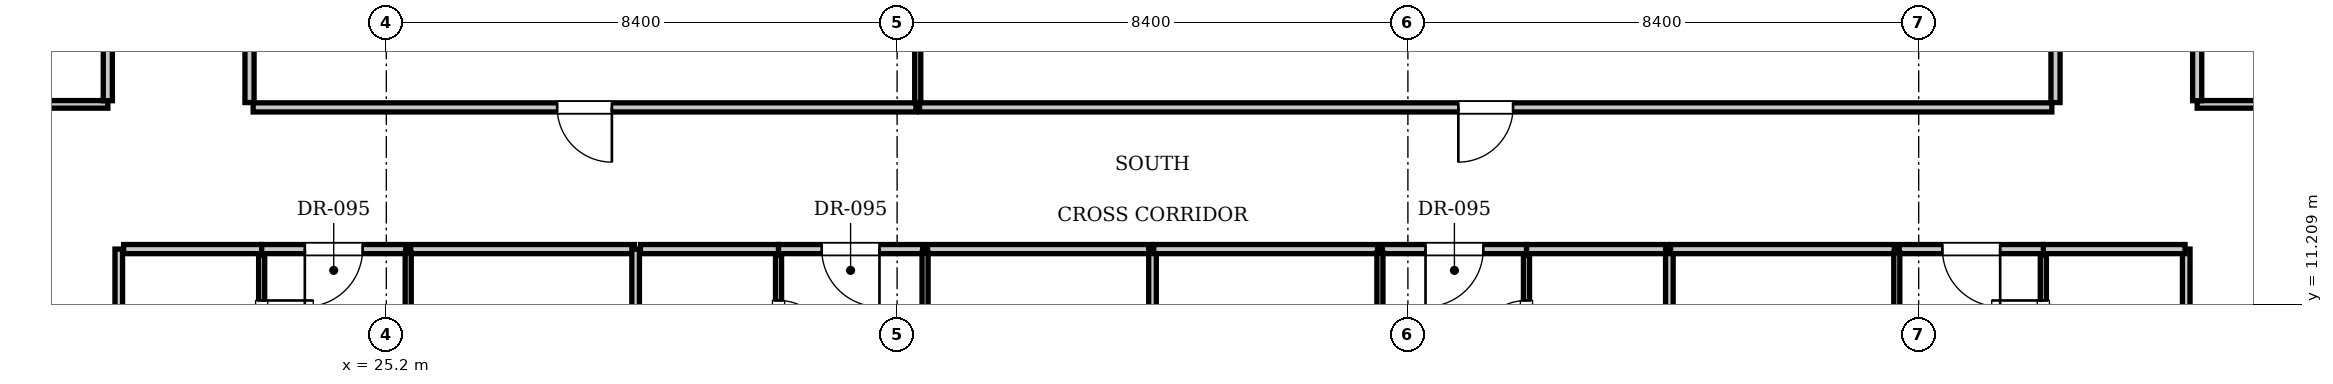
"""IFC4 building model, lengths in metres.
Left out: names, types, materials, properties, quantities, classifications, styles, units other than length and angle.
Written with IfcOpenShell. Run it as: python <this file> out.ifc"""

import sys

from ifc_helpers import new_model, si_unit, direction, frame, frame_2d, origin, place, context, subcontext, project, spatial, rectangle, extrude, element, fill, save


model = new_model("IFC4")
c1 = context("Model", 3, precision=1e-05, world=origin(), true_north=direction((0.0, 1.0)))
c2 = subcontext(c1, "Body", "Model", "MODEL_VIEW")
j1 = project(units=[si_unit("LENGTHUNIT", "METRE"), si_unit("PLANEANGLEUNIT", "RADIAN")], contexts=[c1])
p1 = place(None, origin())
s1 = spatial("IfcSite", under=j1, at=p1, CompositionType="ELEMENT")
p2 = place(p1, origin())
s2 = spatial("IfcBuilding", under=s1, at=p2, CompositionType="ELEMENT")
p3 = place(p2, frame((0.0, 0.0, 92.4)))
s3 = spatial("IfcBuildingStorey", under=s2, at=p3, CompositionType="ELEMENT", Elevation=92.4)
for number, where, z_axis, x_axis in (
    (1, (22.95, 14.53, 0.0), (0.0, 0.0, 1.0), (0.0, 1.0, 0.0)),
    (2, (52.65, 14.53, 0.0), (0.0, 0.0, 1.0), (0.0, 1.0, 0.0)),
):
    element("IfcWall", number, at=place(p3, frame(where, z_axis=z_axis, x_axis=x_axis)), inside=s3, PredefinedType="PARTITIONING", context=c2, shape_type="SweptSolid", body=[
        extrude(rectangle(XDim=8.43, YDim=0.15, at=frame_2d((4.215, 0.0))), origin(), (0.0, 0.0, 1.0), 3.61),
    ])
p4 = place(p3, frame((23.01, 14.45, 0.0), z_axis=(0.0, 0.0, 1.0), x_axis=(1.0, 0.0, 0.0)))
e3 = element("IfcWall", 3, at=p4, inside=s3, PredefinedType="PARTITIONING", context=c2, shape_type="SweptSolid", body=[
    extrude(rectangle(XDim=10.899, YDim=0.15, at=frame_2d((5.449, 0.0))), origin(), (0.0, 0.0, 1.0), 3.61),
])
p5 = place(p4, frame((5.0, 0.0, 0.0)))
e4 = element("IfcOpeningElement", 4, at=p5, cuts=e3, PredefinedType="OPENING", context=c2, shape_type="SweptSolid", body=[
    extrude(rectangle(XDim=0.9, YDim=2.1, at=frame_2d((0.45, 1.05))), frame((0.0, 0.085, 0.0), z_axis=(0.0, -1.0, 0.0), x_axis=(1.0, 0.0, 0.0)), (0.0, 0.0, 1.0), 0.17),
])
p6 = place(p3, frame((33.939, 14.53, 0.0), z_axis=(0.0, 0.0, 1.0), x_axis=(0.0, 1.0, 0.0)))
e5 = element("IfcWall", 5, at=p6, inside=s3, PredefinedType="PARTITIONING", context=c2, shape_type="SweptSolid", body=[
    extrude(rectangle(XDim=8.43, YDim=0.1, at=frame_2d((4.215, 0.0))), origin(), (0.0, 0.0, 1.0), 3.61),
])
p7 = place(p3, frame((33.969, 14.45, 0.0), z_axis=(0.0, 0.0, 1.0), x_axis=(1.0, 0.0, 0.0)))
e6 = element("IfcWall", 6, at=p7, inside=s3, PredefinedType="PARTITIONING", context=c2, shape_type="SweptSolid", body=[
    extrude(rectangle(XDim=18.621, YDim=0.15, at=frame_2d((9.311, 0.0))), origin(), (0.0, 0.0, 1.0), 3.61),
])
p8 = place(p7, frame((8.861, 0.0, 0.0)))
e7 = element("IfcOpeningElement", 7, at=p8, cuts=e6, PredefinedType="OPENING", context=c2, shape_type="SweptSolid", body=[
    extrude(rectangle(XDim=0.9, YDim=2.1, at=frame_2d((0.45, 1.05))), frame((0.0, 0.085, 0.0), z_axis=(0.0, -1.0, 0.0), x_axis=(1.0, 0.0, 0.0)), (0.0, 0.0, 1.0), 0.17),
])
for number, where, z_axis, x_axis in (
    (8, (20.8, 0.1, 0.0), (0.0, 0.0, 1.0), (0.0, 1.0, 0.0)),
    (9, (54.8, 0.1, 0.0), (0.0, 0.0, 1.0), (0.0, 1.0, 0.0)),
):
    element("IfcWall", number, at=place(p3, frame(where, z_axis=z_axis, x_axis=x_axis)), inside=s3, PredefinedType="PARTITIONING", context=c2, shape_type="SweptSolid", body=[
        extrude(rectangle(XDim=12.02, YDim=0.125, at=frame_2d((6.01, 0.0))), origin(), (0.0, 0.0, 1.0), 3.61),
    ])
p9 = place(p3, frame((20.88, 12.12, 0.0), z_axis=(0.0, 0.0, 1.0), x_axis=(1.0, 0.0, 0.0)))
e10 = element("IfcWall", 10, at=p9, inside=s3, PredefinedType="PARTITIONING", context=c2, shape_type="SweptSolid", body=[
    extrude(rectangle(XDim=2.27, YDim=0.15, at=frame_2d((1.135, 0.0))), origin(), (0.0, 0.0, 1.0), 3.61),
])
p10 = place(p3, frame((23.15, 9.68, 0.0), z_axis=(0.0, 0.0, 1.0), x_axis=(0.0, 1.0, 0.0)))
e11 = element("IfcWall", 11, at=p10, inside=s3, PredefinedType="PARTITIONING", context=c2, shape_type="SweptSolid", body=[
    extrude(rectangle(XDim=2.34, YDim=0.1, at=frame_2d((1.17, 0.0))), origin(), (0.0, 0.0, 1.0), 3.61),
])
p11 = place(p10, frame((0.745, 0.0, 0.0)))
e12 = element("IfcOpeningElement", 12, at=p11, cuts=e11, PredefinedType="OPENING", context=c2, shape_type="SweptSolid", body=[
    extrude(rectangle(XDim=0.85, YDim=2.1, at=frame_2d((0.425, 1.05))), frame((0.0, 0.06, 0.0), z_axis=(0.0, -1.0, 0.0), x_axis=(1.0, 0.0, 0.0)), (0.0, 0.0, 1.0), 0.12),
])
p12 = place(p3, frame((23.15, 12.12, 0.0), z_axis=(0.0, 0.0, 1.0), x_axis=(1.0, 0.0, 0.0)))
e13 = element("IfcWall", 13, at=p12, inside=s3, PredefinedType="PARTITIONING", context=c2, shape_type="SweptSolid", body=[
    extrude(rectangle(XDim=2.37, YDim=0.15, at=frame_2d((1.185, 0.0))), origin(), (0.0, 0.0, 1.0), 3.61),
])
p13 = place(p12, frame((0.71, 0.0, 0.0)))
e14 = element("IfcOpeningElement", 14, at=p13, cuts=e13, PredefinedType="OPENING", context=c2, shape_type="SweptSolid", body=[
    extrude(rectangle(XDim=0.95, YDim=2.15, at=frame_2d((0.475, 1.075))), frame((0.0, 0.085, 0.0), z_axis=(0.0, -1.0, 0.0), x_axis=(1.0, 0.0, 0.0)), (0.0, 0.0, 1.0), 0.17),
])
p14 = place(p3, frame((25.6, 12.12, 0.0), z_axis=(0.0, 0.0, 1.0), x_axis=(1.0, 0.0, 0.0)))
e15 = element("IfcWall", 15, at=p14, inside=s3, PredefinedType="PARTITIONING", context=c2, shape_type="SweptSolid", body=[
    extrude(rectangle(XDim=3.68, YDim=0.15, at=frame_2d((1.84, 0.0))), origin(), (0.0, 0.0, 1.0), 3.61),
])
p15 = place(p3, frame((25.56, 0.03, 0.0), z_axis=(0.0, 0.0, 1.0), x_axis=(0.0, 1.0, 0.0)))
e16 = element("IfcWall", 16, at=p15, inside=s3, PredefinedType="PARTITIONING", context=c2, shape_type="SweptSolid", body=[
    extrude(rectangle(XDim=12.03, YDim=0.1, at=frame_2d((6.015, 0.0))), origin(), (0.0, 0.0, 1.0), 3.61),
])
p16 = place(p15, frame((1.6, 0.0, 0.0)))
e17 = element("IfcOpeningElement", 17, at=p16, cuts=e16, PredefinedType="OPENING", context=c2, shape_type="SweptSolid", body=[
    extrude(rectangle(XDim=0.9, YDim=2.1, at=frame_2d((0.45, 1.05))), frame((0.0, 0.06, 0.0), z_axis=(0.0, -1.0, 0.0), x_axis=(1.0, 0.0, 0.0)), (0.0, 0.0, 1.0), 0.12),
])
p17 = place(p3, frame((29.3, 0.1, 0.0), z_axis=(0.0, 0.0, 1.0), x_axis=(0.0, 1.0, 0.0)))
e18 = element("IfcWall", 18, at=p17, inside=s3, PredefinedType="PARTITIONING", context=c2, shape_type="SweptSolid", body=[
    extrude(rectangle(XDim=12.02, YDim=0.125, at=frame_2d((6.01, 0.0))), origin(), (0.0, 0.0, 1.0), 3.293),
])
p18 = place(p3, frame((29.38, 12.12, 0.0), z_axis=(0.0, 0.0, 1.0), x_axis=(1.0, 0.0, 0.0)))
e19 = element("IfcWall", 19, at=p18, inside=s3, PredefinedType="PARTITIONING", context=c2, shape_type="SweptSolid", body=[
    extrude(rectangle(XDim=2.27, YDim=0.15, at=frame_2d((1.135, 0.0))), origin(), (0.0, 0.0, 1.0), 3.61),
])
p19 = place(p3, frame((31.65, 9.68, 0.0), z_axis=(0.0, 0.0, 1.0), x_axis=(0.0, 1.0, 0.0)))
e20 = element("IfcWall", 20, at=p19, inside=s3, PredefinedType="PARTITIONING", context=c2, shape_type="SweptSolid", body=[
    extrude(rectangle(XDim=2.34, YDim=0.1, at=frame_2d((1.17, 0.0))), origin(), (0.0, 0.0, 1.0), 3.61),
])
p20 = place(p19, frame((0.745, 0.0, 0.0)))
e21 = element("IfcOpeningElement", 21, at=p20, cuts=e20, PredefinedType="OPENING", context=c2, shape_type="SweptSolid", body=[
    extrude(rectangle(XDim=0.85, YDim=2.1, at=frame_2d((0.425, 1.05))), frame((0.0, 0.06, 0.0), z_axis=(0.0, -1.0, 0.0), x_axis=(1.0, 0.0, 0.0)), (0.0, 0.0, 1.0), 0.12),
])
p21 = place(p3, frame((31.65, 12.12, 0.0), z_axis=(0.0, 0.0, 1.0), x_axis=(1.0, 0.0, 0.0)))
e22 = element("IfcWall", 22, at=p21, inside=s3, PredefinedType="PARTITIONING", context=c2, shape_type="SweptSolid", body=[
    extrude(rectangle(XDim=2.37, YDim=0.15, at=frame_2d((1.185, 0.0))), origin(), (0.0, 0.0, 1.0), 3.61),
])
p22 = place(p21, frame((0.71, 0.0, 0.0)))
e23 = element("IfcOpeningElement", 23, at=p22, cuts=e22, PredefinedType="OPENING", context=c2, shape_type="SweptSolid", body=[
    extrude(rectangle(XDim=0.95, YDim=2.15, at=frame_2d((0.475, 1.075))), frame((0.0, 0.085, 0.0), z_axis=(0.0, -1.0, 0.0), x_axis=(1.0, 0.0, 0.0)), (0.0, 0.0, 1.0), 0.17),
])
p23 = place(p3, frame((34.1, 12.12, 0.0), z_axis=(0.0, 0.0, 1.0), x_axis=(1.0, 0.0, 0.0)))
e24 = element("IfcWall", 24, at=p23, inside=s3, PredefinedType="PARTITIONING", context=c2, shape_type="SweptSolid", body=[
    extrude(rectangle(XDim=3.68, YDim=0.15, at=frame_2d((1.84, 0.0))), origin(), (0.0, 0.0, 1.0), 3.61),
])
p24 = place(p3, frame((34.06, 0.03, 0.0), z_axis=(0.0, 0.0, 1.0), x_axis=(0.0, 1.0, 0.0)))
e25 = element("IfcWall", 25, at=p24, inside=s3, PredefinedType="PARTITIONING", context=c2, shape_type="SweptSolid", body=[
    extrude(rectangle(XDim=12.03, YDim=0.1, at=frame_2d((6.015, 0.0))), origin(), (0.0, 0.0, 1.0), 3.61),
])
p25 = place(p24, frame((1.6, 0.0, 0.0)))
e26 = element("IfcOpeningElement", 26, at=p25, cuts=e25, PredefinedType="OPENING", context=c2, shape_type="SweptSolid", body=[
    extrude(rectangle(XDim=0.9, YDim=2.1, at=frame_2d((0.45, 1.05))), frame((0.0, 0.06, 0.0), z_axis=(0.0, -1.0, 0.0), x_axis=(1.0, 0.0, 0.0)), (0.0, 0.0, 1.0), 0.12),
])
p26 = place(p3, frame((37.8, 0.1, 0.0), z_axis=(0.0, 0.0, 1.0), x_axis=(0.0, 1.0, 0.0)))
e27 = element("IfcWall", 27, at=p26, inside=s3, PredefinedType="PARTITIONING", context=c2, shape_type="SweptSolid", body=[
    extrude(rectangle(XDim=12.02, YDim=0.125, at=frame_2d((6.01, 0.0))), origin(), (0.0, 0.0, 1.0), 3.3),
])
p27 = place(p3, frame((43.95, 12.12, 0.0), z_axis=(0.0, 0.0, 1.0), x_axis=(1.0, 0.0, 0.0)))
e28 = element("IfcWall", 28, at=p27, inside=s3, PredefinedType="PARTITIONING", context=c2, shape_type="SweptSolid", body=[
    extrude(rectangle(XDim=2.33, YDim=0.15, at=frame_2d((1.165, 0.0))), origin(), (0.0, 0.0, 1.0), 3.61),
])
p28 = place(p3, frame((43.95, 9.68, 0.0), z_axis=(0.0, 0.0, 1.0), x_axis=(0.0, 1.0, 0.0)))
e29 = element("IfcWall", 29, at=p28, inside=s3, PredefinedType="PARTITIONING", context=c2, shape_type="SweptSolid", body=[
    extrude(rectangle(XDim=2.34, YDim=0.1, at=frame_2d((1.17, 0.0))), origin(), (0.0, 0.0, 1.0), 3.61),
])
p29 = place(p28, frame((0.745, 0.0, 0.0)))
e30 = element("IfcOpeningElement", 30, at=p29, cuts=e29, PredefinedType="OPENING", context=c2, shape_type="SweptSolid", body=[
    extrude(rectangle(XDim=0.85, YDim=2.1, at=frame_2d((0.425, 1.05))), frame((0.0, 0.06, 0.0), z_axis=(0.0, -1.0, 0.0), x_axis=(1.0, 0.0, 0.0)), (0.0, 0.0, 1.0), 0.12),
])
p30 = place(p3, frame((37.82, 12.12, 0.0), z_axis=(0.0, 0.0, 1.0), x_axis=(1.0, 0.0, 0.0)))
e31 = element("IfcWall", 31, at=p30, inside=s3, PredefinedType="PARTITIONING", context=c2, shape_type="SweptSolid", body=[
    extrude(rectangle(XDim=3.68, YDim=0.15, at=frame_2d((1.84, 0.0))), origin(), (0.0, 0.0, 1.0), 3.61),
])
p31 = place(p3, frame((41.58, 12.12, 0.0), z_axis=(0.0, 0.0, 1.0), x_axis=(1.0, 0.0, 0.0)))
e32 = element("IfcWall", 32, at=p31, inside=s3, PredefinedType="PARTITIONING", context=c2, shape_type="SweptSolid", body=[
    extrude(rectangle(XDim=2.37, YDim=0.15, at=frame_2d((1.185, 0.0))), origin(), (0.0, 0.0, 1.0), 3.61),
])
p32 = place(p31, frame((0.71, 0.0, 0.0)))
e33 = element("IfcOpeningElement", 33, at=p32, cuts=e32, PredefinedType="OPENING", context=c2, shape_type="SweptSolid", body=[
    extrude(rectangle(XDim=0.95, YDim=2.15, at=frame_2d((0.475, 1.075))), frame((0.0, 0.085, 0.0), z_axis=(0.0, -1.0, 0.0), x_axis=(1.0, 0.0, 0.0)), (0.0, 0.0, 1.0), 0.17),
])
p33 = place(p3, frame((41.54, 0.03, 0.0), z_axis=(0.0, 0.0, 1.0), x_axis=(0.0, 1.0, 0.0)))
e34 = element("IfcWall", 34, at=p33, inside=s3, PredefinedType="PARTITIONING", context=c2, shape_type="SweptSolid", body=[
    extrude(rectangle(XDim=12.03, YDim=0.1, at=frame_2d((6.015, 0.0))), origin(), (0.0, 0.0, 1.0), 3.61),
])
p34 = place(p33, frame((1.6, 0.0, 0.0)))
e35 = element("IfcOpeningElement", 35, at=p34, cuts=e34, PredefinedType="OPENING", context=c2, shape_type="SweptSolid", body=[
    extrude(rectangle(XDim=0.9, YDim=2.1, at=frame_2d((0.45, 1.05))), frame((0.0, 0.06, 0.0), z_axis=(0.0, -1.0, 0.0), x_axis=(1.0, 0.0, 0.0)), (0.0, 0.0, 1.0), 0.12),
])
p35 = place(p3, frame((46.3, 0.1, 0.0), z_axis=(0.0, 0.0, 1.0), x_axis=(0.0, 1.0, 0.0)))
e36 = element("IfcWall", 36, at=p35, inside=s3, PredefinedType="PARTITIONING", context=c2, shape_type="SweptSolid", body=[
    extrude(rectangle(XDim=12.02, YDim=0.125, at=frame_2d((6.01, 0.0))), origin(), (0.0, 0.0, 1.0), 3.352),
])
p36 = place(p3, frame((52.45, 12.12, 0.0), z_axis=(0.0, 0.0, 1.0), x_axis=(1.0, 0.0, 0.0)))
e37 = element("IfcWall", 37, at=p36, inside=s3, PredefinedType="PARTITIONING", context=c2, shape_type="SweptSolid", body=[
    extrude(rectangle(XDim=2.33, YDim=0.15, at=frame_2d((1.165, 0.0))), origin(), (0.0, 0.0, 1.0), 3.61),
])
p37 = place(p3, frame((52.45, 9.68, 0.0), z_axis=(0.0, 0.0, 1.0), x_axis=(0.0, 1.0, 0.0)))
e38 = element("IfcWall", 38, at=p37, inside=s3, PredefinedType="PARTITIONING", context=c2, shape_type="SweptSolid", body=[
    extrude(rectangle(XDim=2.34, YDim=0.1, at=frame_2d((1.17, 0.0))), origin(), (0.0, 0.0, 1.0), 3.61),
])
p38 = place(p37, frame((0.745, 0.0, 0.0)))
e39 = element("IfcOpeningElement", 39, at=p38, cuts=e38, PredefinedType="OPENING", context=c2, shape_type="SweptSolid", body=[
    extrude(rectangle(XDim=0.85, YDim=2.1, at=frame_2d((0.425, 1.05))), frame((0.0, 0.06, 0.0), z_axis=(0.0, -1.0, 0.0), x_axis=(1.0, 0.0, 0.0)), (0.0, 0.0, 1.0), 0.12),
])
p39 = place(p3, frame((46.32, 12.12, 0.0), z_axis=(0.0, 0.0, 1.0), x_axis=(1.0, 0.0, 0.0)))
e40 = element("IfcWall", 40, at=p39, inside=s3, PredefinedType="PARTITIONING", context=c2, shape_type="SweptSolid", body=[
    extrude(rectangle(XDim=3.68, YDim=0.15, at=frame_2d((1.84, 0.0))), origin(), (0.0, 0.0, 1.0), 3.61),
])
p40 = place(p3, frame((50.08, 12.12, 0.0), z_axis=(0.0, 0.0, 1.0), x_axis=(1.0, 0.0, 0.0)))
e41 = element("IfcWall", 41, at=p40, inside=s3, PredefinedType="PARTITIONING", context=c2, shape_type="SweptSolid", body=[
    extrude(rectangle(XDim=2.37, YDim=0.15, at=frame_2d((1.185, 0.0))), origin(), (0.0, 0.0, 1.0), 3.61),
])
p41 = place(p40, frame((0.71, 0.0, 0.0)))
e42 = element("IfcOpeningElement", 42, at=p41, cuts=e41, PredefinedType="OPENING", context=c2, shape_type="SweptSolid", body=[
    extrude(rectangle(XDim=0.95, YDim=2.15, at=frame_2d((0.475, 1.075))), frame((0.0, 0.085, 0.0), z_axis=(0.0, -1.0, 0.0), x_axis=(1.0, 0.0, 0.0)), (0.0, 0.0, 1.0), 0.17),
])
p42 = place(p3, frame((50.04, 0.03, 0.0), z_axis=(0.0, 0.0, 1.0), x_axis=(0.0, 1.0, 0.0)))
e43 = element("IfcWall", 43, at=p42, inside=s3, PredefinedType="PARTITIONING", context=c2, shape_type="SweptSolid", body=[
    extrude(rectangle(XDim=12.03, YDim=0.1, at=frame_2d((6.015, 0.0))), origin(), (0.0, 0.0, 1.0), 3.61),
])
p43 = place(p42, frame((1.6, 0.0, 0.0)))
e44 = element("IfcOpeningElement", 44, at=p43, cuts=e43, PredefinedType="OPENING", context=c2, shape_type="SweptSolid", body=[
    extrude(rectangle(XDim=0.9, YDim=2.1, at=frame_2d((0.45, 1.05))), frame((0.0, 0.06, 0.0), z_axis=(0.0, -1.0, 0.0), x_axis=(1.0, 0.0, 0.0)), (0.0, 0.0, 1.0), 0.12),
])
p44 = place(p3, frame((10.9, 14.5, 0.0), z_axis=(0.0, 0.0, 1.0), x_axis=(1.0, 0.0, 0.0)))
e45 = element("IfcWall", 45, at=p44, inside=s3, PredefinedType="PARTITIONING", context=c2, shape_type="SweptSolid", body=[
    extrude(rectangle(XDim=9.72, YDim=0.125, at=frame_2d((4.86, 0.0))), origin(), (0.0, 0.0, 1.0), 3.61),
])
p45 = place(p3, frame((54.98, 14.5, 0.0), z_axis=(0.0, 0.0, 1.0), x_axis=(1.0, 0.0, 0.0)))
e46 = element("IfcWall", 46, at=p45, inside=s3, PredefinedType="PARTITIONING", context=c2, shape_type="SweptSolid", body=[
    extrude(rectangle(XDim=9.72, YDim=0.125, at=frame_2d((4.86, 0.0))), origin(), (0.0, 0.0, 1.0), 3.61),
])
for number, where, z_axis, x_axis in (
    (47, (20.62, 14.56, 0.0), (0.0, 0.0, 1.0), (0.0, 1.0, 0.0)),
    (48, (54.98, 14.56, 0.0), (0.0, 0.0, 1.0), (0.0, 1.0, 0.0)),
):
    element("IfcWall", number, at=place(p3, frame(where, z_axis=z_axis, x_axis=x_axis)), inside=s3, PredefinedType="PARTITIONING", context=c2, shape_type="SweptSolid", body=[
        extrude(rectangle(XDim=2.02, YDim=0.15, at=frame_2d((1.01, 0.0))), origin(), (0.0, 0.0, 1.0), 3.61),
    ])
p46 = place(p5, frame((0.9, 0.0, 0.0), z_axis=(0.0, 0.0, 1.0), x_axis=(-1.0, 0.0, 0.0)))
e49 = element("IfcDoor", 49, at=p46, inside=s3, OperationType="SINGLE_SWING_LEFT", PredefinedType="DOOR", context=c2, shape_type="SweptSolid", body=[
    extrude(rectangle(XDim=0.9, YDim=2.1, at=frame_2d((0.45, 1.05))), frame((0.0, 0.025, 0.0), z_axis=(0.0, -1.0, 0.0), x_axis=(1.0, 0.0, 0.0)), (0.0, 0.0, 1.0), 0.05),
])
fill(e4, e49)
p47 = place(p8, frame((0.9, 0.0, 0.0), z_axis=(0.0, 0.0, 1.0), x_axis=(-1.0, 0.0, 0.0)))
e50 = element("IfcDoor", 50, at=p47, inside=s3, OperationType="SINGLE_SWING_RIGHT", PredefinedType="DOOR", context=c2, shape_type="SweptSolid", body=[
    extrude(rectangle(XDim=0.9, YDim=2.1, at=frame_2d((0.45, 1.05))), frame((0.0, 0.025, 0.0), z_axis=(0.0, -1.0, 0.0), x_axis=(1.0, 0.0, 0.0)), (0.0, 0.0, 1.0), 0.05),
])
fill(e7, e50)
p48 = place(p11, frame((0.85, 0.0, 0.0), z_axis=(0.0, 0.0, 1.0), x_axis=(-1.0, 0.0, 0.0)))
e51 = element("IfcDoor", 51, at=p48, inside=s3, OperationType="SINGLE_SWING_LEFT", PredefinedType="DOOR", context=c2, shape_type="SweptSolid", body=[
    extrude(rectangle(XDim=0.85, YDim=2.1, at=frame_2d((0.425, 1.05))), frame((0.0, 0.025, 0.0), z_axis=(0.0, -1.0, 0.0), x_axis=(1.0, 0.0, 0.0)), (0.0, 0.0, 1.0), 0.05),
])
fill(e12, e51)
p49 = place(p13, frame((0.95, 0.0, 0.0), z_axis=(0.0, 0.0, 1.0), x_axis=(-1.0, 0.0, 0.0)))
e52 = element("IfcDoor", 52, at=p49, inside=s3, OperationType="SINGLE_SWING_RIGHT", PredefinedType="DOOR", context=c2, shape_type="SweptSolid", body=[
    extrude(rectangle(XDim=0.95, YDim=2.15, at=frame_2d((0.475, 1.075))), frame((0.0, 0.025, 0.0), z_axis=(0.0, -1.0, 0.0), x_axis=(1.0, 0.0, 0.0)), (0.0, 0.0, 1.0), 0.05),
])
fill(e14, e52)
p50 = place(p20, frame((0.85, 0.0, 0.0), z_axis=(0.0, 0.0, 1.0), x_axis=(-1.0, 0.0, 0.0)))
e53 = element("IfcDoor", 53, at=p50, inside=s3, OperationType="SINGLE_SWING_RIGHT", PredefinedType="DOOR", context=c2, shape_type="SweptSolid", body=[
    extrude(rectangle(XDim=0.85, YDim=2.1, at=frame_2d((0.425, 1.05))), frame((0.0, 0.025, 0.0), z_axis=(0.0, -1.0, 0.0), x_axis=(1.0, 0.0, 0.0)), (0.0, 0.0, 1.0), 0.05),
])
fill(e21, e53)
p51 = place(p22, frame((0.95, 0.0, 0.0), z_axis=(0.0, 0.0, 1.0), x_axis=(-1.0, 0.0, 0.0)))
e54 = element("IfcDoor", 54, at=p51, inside=s3, OperationType="SINGLE_SWING_LEFT", PredefinedType="DOOR", context=c2, shape_type="SweptSolid", body=[
    extrude(rectangle(XDim=0.95, YDim=2.15, at=frame_2d((0.475, 1.075))), frame((0.0, 0.025, 0.0), z_axis=(0.0, -1.0, 0.0), x_axis=(1.0, 0.0, 0.0)), (0.0, 0.0, 1.0), 0.05),
])
fill(e23, e54)
p52 = place(p29, origin())
e55 = element("IfcDoor", 55, at=p52, inside=s3, OperationType="SINGLE_SWING_LEFT", PredefinedType="DOOR", context=c2, shape_type="SweptSolid", body=[
    extrude(rectangle(XDim=0.85, YDim=2.1, at=frame_2d((0.425, 1.05))), frame((0.0, 0.025, 0.0), z_axis=(0.0, -1.0, 0.0), x_axis=(1.0, 0.0, 0.0)), (0.0, 0.0, 1.0), 0.05),
])
fill(e30, e55)
p53 = place(p32, frame((0.95, 0.0, 0.0), z_axis=(0.0, 0.0, 1.0), x_axis=(-1.0, 0.0, 0.0)))
e56 = element("IfcDoor", 56, at=p53, inside=s3, OperationType="SINGLE_SWING_RIGHT", PredefinedType="DOOR", context=c2, shape_type="SweptSolid", body=[
    extrude(rectangle(XDim=0.95, YDim=2.15, at=frame_2d((0.475, 1.075))), frame((0.0, 0.025, 0.0), z_axis=(0.0, -1.0, 0.0), x_axis=(1.0, 0.0, 0.0)), (0.0, 0.0, 1.0), 0.05),
])
fill(e33, e56)
p54 = place(p38, origin())
e57 = element("IfcDoor", 57, at=p54, inside=s3, OperationType="SINGLE_SWING_RIGHT", PredefinedType="DOOR", context=c2, shape_type="SweptSolid", body=[
    extrude(rectangle(XDim=0.85, YDim=2.1, at=frame_2d((0.425, 1.05))), frame((0.0, 0.025, 0.0), z_axis=(0.0, -1.0, 0.0), x_axis=(1.0, 0.0, 0.0)), (0.0, 0.0, 1.0), 0.05),
])
fill(e39, e57)
p55 = place(p41, frame((0.95, 0.0, 0.0), z_axis=(0.0, 0.0, 1.0), x_axis=(-1.0, 0.0, 0.0)))
e58 = element("IfcDoor", 58, at=p55, inside=s3, OperationType="SINGLE_SWING_LEFT", PredefinedType="DOOR", context=c2, shape_type="SweptSolid", body=[
    extrude(rectangle(XDim=0.95, YDim=2.15, at=frame_2d((0.475, 1.075))), frame((0.0, 0.025, 0.0), z_axis=(0.0, -1.0, 0.0), x_axis=(1.0, 0.0, 0.0)), (0.0, 0.0, 1.0), 0.05),
])
fill(e42, e58)
save(model, sys.argv[1])
